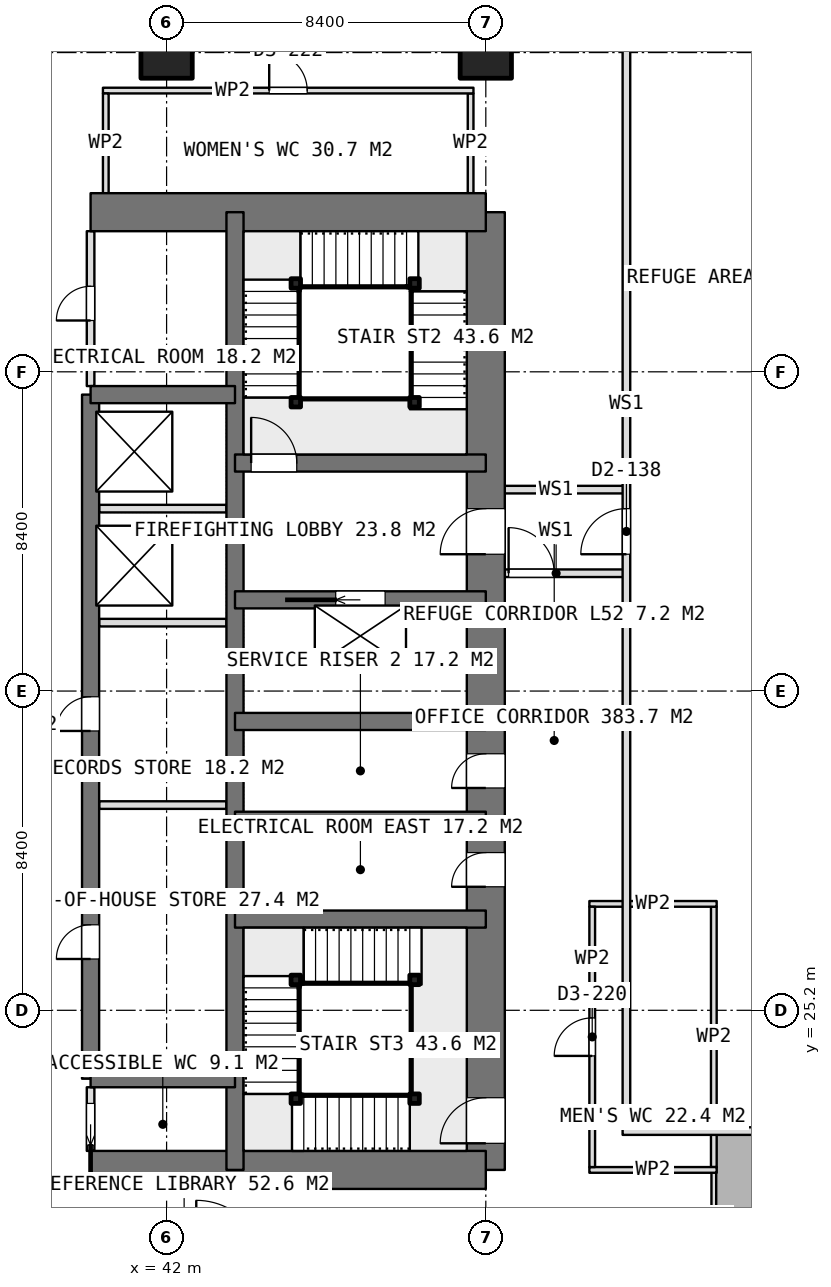
"""IFC4 building model, lengths in metres.
Left out: names, types, materials, properties, quantities, classifications, styles, units other than length and angle.
Written with IfcOpenShell. Run it as: python <this file> out.ifc"""

import sys

from ifc_helpers import new_model, si_unit, direction, frame, frame_2d, origin, origin_2d, place, context, subcontext, project, spatial, rectangle, extrude, element, fill, save


model = new_model("IFC4")
c1 = context("Model", 3, precision=1e-05, world=origin(), true_north=direction((0.0, 1.0)))
c2 = subcontext(c1, "Body", "Model", "MODEL_VIEW")
j1 = project(units=[si_unit("LENGTHUNIT", "METRE"), si_unit("PLANEANGLEUNIT", "RADIAN")], contexts=[c1])
p1 = place(None, origin())
s1 = spatial("IfcSite", under=j1, at=p1, CompositionType="ELEMENT")
p2 = place(p1, origin())
s2 = spatial("IfcBuilding", under=s1, at=p2, CompositionType="ELEMENT")
p3 = place(p2, frame((0.0, 0.0, 206.45)))
s3 = spatial("IfcBuildingStorey", under=s2, at=p3, CompositionType="ELEMENT", Elevation=206.45)
for number, where, z_axis, x_axis in (
    (1, (40.0, 21.0, 0.0), (0.0, 0.0, 1.0), (1.0, 0.0, 0.0)),
    (2, (40.0, 46.2, 0.0), (0.0, 0.0, 1.0), (1.0, 0.0, 0.0)),
):
    element("IfcWall", number, at=place(p3, frame(where, z_axis=z_axis, x_axis=x_axis)), inside=s3, PredefinedType="SHEAR", context=c2, shape_type="SweptSolid", body=[
        extrude(rectangle(XDim=10.4, YDim=1.0, at=frame_2d((5.2, 0.0))), origin(), (0.0, 0.0, 1.0), 3.75),
    ])
p4 = place(p3, frame((50.4, 21.0, 0.0), z_axis=(0.0, 0.0, 1.0), x_axis=(0.0, 1.0, 0.0)))
e3 = element("IfcWall", 3, at=p4, inside=s3, PredefinedType="SHEAR", context=c2, shape_type="SweptSolid", body=[
    extrude(rectangle(XDim=25.2, YDim=1.0, at=frame_2d((12.6, 0.0))), origin(), (0.0, 0.0, 1.0), 3.75),
])
p5 = place(p4, frame((16.2, 0.0, 0.0)))
e4 = element("IfcOpeningElement", 4, at=p5, cuts=e3, PredefinedType="OPENING", context=c2, shape_type="SweptSolid", body=[
    extrude(rectangle(XDim=1.2, YDim=2.1, at=frame_2d((0.6, 1.05))), frame((0.0, 0.51, 0.0), z_axis=(0.0, -1.0, 0.0), x_axis=(1.0, 0.0, 0.0)), (0.0, 0.0, 1.0), 1.02),
])
p6 = place(p4, frame((10.05, 0.0, 0.0)))
e5 = element("IfcOpeningElement", 5, at=p6, cuts=e3, PredefinedType="OPENING", context=c2, shape_type="SweptSolid", body=[
    extrude(rectangle(XDim=0.9, YDim=2.1, at=frame_2d((0.45, 1.05))), frame((0.0, 0.51, 0.0), z_axis=(0.0, -1.0, 0.0), x_axis=(1.0, 0.0, 0.0)), (0.0, 0.0, 1.0), 1.02),
])
p7 = place(p4, frame((7.45, 0.0, 0.0)))
e6 = element("IfcOpeningElement", 6, at=p7, cuts=e3, PredefinedType="OPENING", context=c2, shape_type="SweptSolid", body=[
    extrude(rectangle(XDim=0.9, YDim=2.1, at=frame_2d((0.45, 1.05))), frame((0.0, 0.51, 0.0), z_axis=(0.0, -1.0, 0.0), x_axis=(1.0, 0.0, 0.0)), (0.0, 0.0, 1.0), 1.02),
])
p8 = place(p4, frame((0.7, 0.0, 0.0)))
e7 = element("IfcOpeningElement", 7, at=p8, cuts=e3, PredefinedType="OPENING", context=c2, shape_type="SweptSolid", body=[
    extrude(rectangle(XDim=1.2, YDim=2.1, at=frame_2d((0.6, 1.05))), frame((0.0, 0.51, 0.0), z_axis=(0.0, -1.0, 0.0), x_axis=(1.0, 0.0, 0.0)), (0.0, 0.0, 1.0), 1.02),
])
p9 = place(p3, frame((43.8, 21.0, 0.0), z_axis=(0.0, 0.0, 1.0), x_axis=(0.0, 1.0, 0.0)))
e8 = element("IfcWall", 8, at=p9, inside=s3, PredefinedType="SHEAR", context=c2, shape_type="SweptSolid", body=[
    extrude(rectangle(XDim=25.2, YDim=0.45, at=frame_2d((12.6, 0.0))), origin(), (0.0, 0.0, 1.0), 3.75),
])
p10 = place(p3, frame((40.0, 23.4, 0.0), z_axis=(0.0, 0.0, 1.0), x_axis=(0.0, 1.0, 0.0)))
e9 = element("IfcWall", 9, at=p10, inside=s3, PredefinedType="SHEAR", context=c2, shape_type="SweptSolid", body=[
    extrude(rectangle(XDim=18.0, YDim=0.45, at=frame_2d((9.0, 0.0))), origin(), (0.0, 0.0, 1.0), 3.75),
])
p11 = place(p10, frame((3.15, 0.0, 0.0)))
e10 = element("IfcOpeningElement", 10, at=p11, cuts=e9, PredefinedType="OPENING", context=c2, shape_type="SweptSolid", body=[
    extrude(rectangle(XDim=0.9, YDim=2.1, at=frame_2d((0.45, 1.05))), frame((0.0, 0.235, 0.0), z_axis=(0.0, -1.0, 0.0), x_axis=(1.0, 0.0, 0.0)), (0.0, 0.0, 1.0), 0.47),
])
p12 = place(p10, frame((9.15, 0.0, 0.0)))
e11 = element("IfcOpeningElement", 11, at=p12, cuts=e9, PredefinedType="OPENING", context=c2, shape_type="SweptSolid", body=[
    extrude(rectangle(XDim=0.9, YDim=2.1, at=frame_2d((0.45, 1.05))), frame((0.0, 0.235, 0.0), z_axis=(0.0, -1.0, 0.0), x_axis=(1.0, 0.0, 0.0)), (0.0, 0.0, 1.0), 0.47),
])
for number, where, z_axis, x_axis in (
    (12, (40.0, 23.4, 0.0), (0.0, 0.0, 1.0), (1.0, 0.0, 0.0)),
    (13, (40.0, 41.4, 0.0), (0.0, 0.0, 1.0), (1.0, 0.0, 0.0)),
):
    element("IfcWall", number, at=place(p3, frame(where, z_axis=z_axis, x_axis=x_axis)), inside=s3, PredefinedType="SHEAR", context=c2, shape_type="SweptSolid", body=[
        extrude(rectangle(XDim=3.8, YDim=0.45, at=frame_2d((1.9, 0.0))), origin(), (0.0, 0.0, 1.0), 3.75),
    ])
for number, where, z_axis, x_axis in (
    (14, (43.8, 27.6, 0.0), (0.0, 0.0, 1.0), (1.0, 0.0, 0.0)),
    (15, (43.8, 30.2, 0.0), (0.0, 0.0, 1.0), (1.0, 0.0, 0.0)),
    (16, (43.8, 32.8, 0.0), (0.0, 0.0, 1.0), (1.0, 0.0, 0.0)),
):
    element("IfcWall", number, at=place(p3, frame(where, z_axis=z_axis, x_axis=x_axis)), inside=s3, PredefinedType="SHEAR", context=c2, shape_type="SweptSolid", body=[
        extrude(rectangle(XDim=6.6, YDim=0.45, at=frame_2d((3.3, 0.0))), origin(), (0.0, 0.0, 1.0), 3.75),
    ])
p13 = place(p3, frame((43.8, 36.0, 0.0), z_axis=(0.0, 0.0, 1.0), x_axis=(1.0, 0.0, 0.0)))
e17 = element("IfcWall", 17, at=p13, inside=s3, PredefinedType="SHEAR", context=c2, shape_type="SweptSolid", body=[
    extrude(rectangle(XDim=6.6, YDim=0.45, at=frame_2d((3.3, 0.0))), origin(), (0.0, 0.0, 1.0), 3.75),
])
p14 = place(p13, frame((2.65, 0.0, 0.0)))
e18 = element("IfcOpeningElement", 18, at=p14, cuts=e17, PredefinedType="OPENING", context=c2, shape_type="SweptSolid", body=[
    extrude(rectangle(XDim=1.3, YDim=2.1, at=frame_2d((0.65, 1.05))), frame((0.0, 0.235, 0.0), z_axis=(0.0, -1.0, 0.0), x_axis=(1.0, 0.0, 0.0)), (0.0, 0.0, 1.0), 0.47),
])
p15 = place(p3, frame((43.8, 39.6, 0.0), z_axis=(0.0, 0.0, 1.0), x_axis=(1.0, 0.0, 0.0)))
e19 = element("IfcWall", 19, at=p15, inside=s3, PredefinedType="SHEAR", context=c2, shape_type="SweptSolid", body=[
    extrude(rectangle(XDim=6.6, YDim=0.45, at=frame_2d((3.3, 0.0))), origin(), (0.0, 0.0, 1.0), 3.75),
])
p16 = place(p15, frame((0.425, 0.0, 0.0)))
e20 = element("IfcOpeningElement", 20, at=p16, cuts=e19, PredefinedType="OPENING", context=c2, shape_type="SweptSolid", body=[
    extrude(rectangle(XDim=1.2, YDim=2.1, at=frame_2d((0.6, 1.05))), frame((0.0, 0.235, 0.0), z_axis=(0.0, -1.0, 0.0), x_axis=(1.0, 0.0, 0.0)), (0.0, 0.0, 1.0), 0.47),
])
for number, where, z_axis, x_axis in (
    (21, (42.0, 50.4, 0.0), (0.0, 0.0, 1.0), (1.0, 0.0, 0.0)),
    (22, (50.4, 50.4, 0.0), (0.0, 0.0, 1.0), (1.0, 0.0, 0.0)),
):
    element("IfcColumn", number, at=place(p3, frame(where, z_axis=z_axis, x_axis=x_axis)), inside=s3, PredefinedType="COLUMN", context=c2, shape_type="SweptSolid", body=[
        extrude(rectangle(XDim=1.35, YDim=1.35, at=origin_2d()), origin(), (0.0, 0.0, 1.0), 3.75),
    ])
for number, where, z_axis, x_axis in (
    (23, (40.225, 35.4, 0.0), (0.0, 0.0, 1.0), (1.0, 0.0, 0.0)),
    (24, (40.225, 38.4, 0.0), (0.0, 0.0, 1.0), (1.0, 0.0, 0.0)),
):
    element("IfcWall", number, at=place(p3, frame(where, z_axis=z_axis, x_axis=x_axis)), inside=s3, PredefinedType="PARTITIONING", context=c2, shape_type="SweptSolid", body=[
        extrude(rectangle(XDim=3.35, YDim=0.2, at=frame_2d((1.675, 0.0))), origin(), (0.0, 0.0, 1.0), 3.5),
    ])
p17 = place(p3, frame((40.0, 21.5, 0.0), z_axis=(0.0, 0.0, 1.0), x_axis=(0.0, 1.0, 0.0)))
e25 = element("IfcWall", 25, at=p17, inside=s3, PredefinedType="PARTITIONING", context=c2, shape_type="SweptSolid", body=[
    extrude(rectangle(XDim=1.675, YDim=0.2, at=frame_2d((0.837, 0.0))), origin(), (0.0, 0.0, 1.0), 3.5),
])
p18 = place(p17, frame((0.15, 0.0, 0.0)))
e26 = element("IfcOpeningElement", 26, at=p18, cuts=e25, PredefinedType="OPENING", context=c2, shape_type="SweptSolid", body=[
    extrude(rectangle(XDim=1.1, YDim=2.1, at=frame_2d((0.55, 1.05))), frame((0.0, 0.11, 0.0), z_axis=(0.0, -1.0, 0.0), x_axis=(1.0, 0.0, 0.0)), (0.0, 0.0, 1.0), 0.22),
])
p19 = place(p3, frame((40.0, 41.625, 0.0), z_axis=(0.0, 0.0, 1.0), x_axis=(0.0, 1.0, 0.0)))
e27 = element("IfcWall", 27, at=p19, inside=s3, PredefinedType="PARTITIONING", context=c2, shape_type="SweptSolid", body=[
    extrude(rectangle(XDim=4.075, YDim=0.2, at=frame_2d((2.038, 0.0))), origin(), (0.0, 0.0, 1.0), 3.5),
])
p20 = place(p19, frame((1.725, 0.0, 0.0)))
e28 = element("IfcOpeningElement", 28, at=p20, cuts=e27, PredefinedType="OPENING", context=c2, shape_type="SweptSolid", body=[
    extrude(rectangle(XDim=0.9, YDim=2.1, at=frame_2d((0.45, 1.05))), frame((0.0, 0.11, 0.0), z_axis=(0.0, -1.0, 0.0), x_axis=(1.0, 0.0, 0.0)), (0.0, 0.0, 1.0), 0.22),
])
p21 = place(p3, frame((40.225, 30.6, 0.0), z_axis=(0.0, 0.0, 1.0), x_axis=(1.0, 0.0, 0.0)))
e29 = element("IfcWall", 29, at=p21, inside=s3, PredefinedType="PARTITIONING", context=c2, shape_type="SweptSolid", body=[
    extrude(rectangle(XDim=3.35, YDim=0.2, at=frame_2d((1.675, 0.0))), origin(), (0.0, 0.0, 1.0), 3.5),
])
p22 = place(p3, frame((40.325, 49.4, 0.0), z_axis=(0.0, 0.0, 1.0), x_axis=(1.0, 0.0, 0.0)))
e30 = element("IfcWall", 30, at=p22, inside=s3, PredefinedType="PARTITIONING", context=c2, shape_type="SweptSolid", body=[
    extrude(rectangle(XDim=9.75, YDim=0.15, at=frame_2d((4.875, 0.0))), origin(), (0.0, 0.0, 1.0), 3.5),
])
p23 = place(p22, frame((4.375, 0.0, 0.0)))
e31 = element("IfcOpeningElement", 31, at=p23, cuts=e30, PredefinedType="OPENING", context=c2, shape_type="SweptSolid", body=[
    extrude(rectangle(XDim=1.0, YDim=2.1, at=frame_2d((0.5, 1.05))), frame((0.0, 0.085, 0.0), z_axis=(0.0, -1.0, 0.0), x_axis=(1.0, 0.0, 0.0)), (0.0, 0.0, 1.0), 0.17),
])
for number, where, z_axis, x_axis in (
    (32, (40.4, 46.7, 0.0), (0.0, 0.0, 1.0), (0.0, 1.0, 0.0)),
    (33, (50.0, 46.7, 0.0), (0.0, 0.0, 1.0), (0.0, 1.0, 0.0)),
):
    element("IfcWall", number, at=place(p3, frame(where, z_axis=z_axis, x_axis=x_axis)), inside=s3, PredefinedType="PARTITIONING", context=c2, shape_type="SweptSolid", body=[
        extrude(rectangle(XDim=2.625, YDim=0.15, at=frame_2d((1.312, 0.0))), origin(), (0.0, 0.0, 1.0), 3.5),
    ])
for number, where, z_axis, x_axis in (
    (34, (53.125, 21.0, 0.0), (0.0, 0.0, 1.0), (1.0, 0.0, 0.0)),
    (35, (53.125, 28.0, 0.0), (0.0, 0.0, 1.0), (1.0, 0.0, 0.0)),
):
    element("IfcWall", number, at=place(p3, frame(where, z_axis=z_axis, x_axis=x_axis)), inside=s3, PredefinedType="PARTITIONING", context=c2, shape_type="SweptSolid", body=[
        extrude(rectangle(XDim=3.35, YDim=0.15, at=frame_2d((1.675, 0.0))), origin(), (0.0, 0.0, 1.0), 3.5),
    ])
p24 = place(p3, frame((53.2, 21.075, 0.0), z_axis=(0.0, 0.0, 1.0), x_axis=(0.0, 1.0, 0.0)))
e36 = element("IfcWall", 36, at=p24, inside=s3, PredefinedType="PARTITIONING", context=c2, shape_type="SweptSolid", body=[
    extrude(rectangle(XDim=6.85, YDim=0.15, at=frame_2d((3.425, 0.0))), origin(), (0.0, 0.0, 1.0), 3.5),
])
p25 = place(p24, frame((2.925, 0.0, 0.0)))
e37 = element("IfcOpeningElement", 37, at=p25, cuts=e36, PredefinedType="OPENING", context=c2, shape_type="SweptSolid", body=[
    extrude(rectangle(XDim=1.0, YDim=2.1, at=frame_2d((0.5, 1.05))), frame((0.0, 0.085, 0.0), z_axis=(0.0, -1.0, 0.0), x_axis=(1.0, 0.0, 0.0)), (0.0, 0.0, 1.0), 0.17),
])
p26 = place(p3, frame((56.4, 21.075, 0.0), z_axis=(0.0, 0.0, 1.0), x_axis=(0.0, 1.0, 0.0)))
e38 = element("IfcWall", 38, at=p26, inside=s3, PredefinedType="PARTITIONING", context=c2, shape_type="SweptSolid", body=[
    extrude(rectangle(XDim=6.85, YDim=0.15, at=frame_2d((3.425, 0.0))), origin(), (0.0, 0.0, 1.0), 3.5),
])
p27 = place(p3, frame((56.4, 18.4, 0.0), z_axis=(0.0, 0.0, 1.0), x_axis=(0.0, 1.0, 0.0)))
e39 = element("IfcWall", 39, at=p27, inside=s3, PredefinedType="PARTITIONING", context=c2, shape_type="SweptSolid", body=[
    extrude(rectangle(XDim=2.675, YDim=0.125, at=frame_2d((1.337, 0.0))), origin(), (0.0, 0.0, 1.0), 3.5),
])
for number, where, z_axis, x_axis in (
    (40, (45.4, 41.2, 0.0), (0.0, 0.0, 1.0), (1.0, 0.0, 0.0)),
    (41, (45.4, 44.325, 0.0), (0.0, 0.0, 1.0), (1.0, 0.0, 0.0)),
    (42, (48.525, 44.325, 0.0), (0.0, 0.0, 1.0), (1.0, 0.0, 0.0)),
    (43, (48.525, 41.2, 0.0), (0.0, 0.0, 1.0), (1.0, 0.0, 0.0)),
    (44, (48.525, 22.875, 0.0), (0.0, 0.0, 1.0), (1.0, 0.0, 0.0)),
    (45, (45.4, 22.875, 0.0), (0.0, 0.0, 1.0), (1.0, 0.0, 0.0)),
    (46, (45.4, 26.0, 0.0), (0.0, 0.0, 1.0), (1.0, 0.0, 0.0)),
    (47, (48.525, 26.0, 0.0), (0.0, 0.0, 1.0), (1.0, 0.0, 0.0)),
):
    element("IfcColumn", number, at=place(p3, frame(where, z_axis=z_axis, x_axis=x_axis)), inside=s3, PredefinedType="COLUMN", context=c2, shape_type="SweptSolid", body=[
        extrude(rectangle(XDim=0.25, YDim=0.25, at=origin_2d()), origin(), (0.0, 0.0, 1.0), 3.75),
    ])
p28 = place(p3, frame((54.1, 22.122, 0.0), z_axis=(0.0, 0.0, 1.0), x_axis=(0.0, 1.0, 0.0)))
e48 = element("IfcWall", 48, at=p28, inside=s3, PredefinedType="PARTITIONING", context=c2, shape_type="SweptSolid", body=[
    extrude(rectangle(XDim=38.087, YDim=0.2, at=frame_2d((19.043, 0.0))), origin(), (0.0, 0.0, 1.0), 3.5),
])
p29 = place(p28, frame((15.078, 0.0, 0.0)))
e49 = element("IfcOpeningElement", 49, at=p29, cuts=e48, PredefinedType="OPENING", context=c2, shape_type="SweptSolid", body=[
    extrude(rectangle(XDim=1.2, YDim=2.1, at=frame_2d((0.6, 1.05))), frame((0.0, 0.11, 0.0), z_axis=(0.0, -1.0, 0.0), x_axis=(1.0, 0.0, 0.0)), (0.0, 0.0, 1.0), 0.22),
])
p30 = place(p3, frame((54.0, 22.022, 0.0), z_axis=(0.0, 0.0, 1.0), x_axis=(1.0, 0.0, 0.0)))
e50 = element("IfcWall", 50, at=p30, inside=s3, PredefinedType="PARTITIONING", context=c2, shape_type="SweptSolid", body=[
    extrude(rectangle(XDim=7.26, YDim=0.2, at=frame_2d((3.63, 0.0))), origin(), (0.0, 0.0, 1.0), 3.5),
])
p31 = place(p3, frame((50.4, 38.9, 0.0), z_axis=(0.0, 0.0, 1.0), x_axis=(1.0, 0.0, 0.0)))
e51 = element("IfcWall", 51, at=p31, inside=s3, PredefinedType="PARTITIONING", context=c2, shape_type="SweptSolid", body=[
    extrude(rectangle(XDim=3.7, YDim=0.2, at=frame_2d((1.85, 0.0))), origin(), (0.0, 0.0, 1.0), 3.5),
])
p32 = place(p3, frame((50.4, 36.7, 0.0), z_axis=(0.0, 0.0, 1.0), x_axis=(1.0, 0.0, 0.0)))
e52 = element("IfcWall", 52, at=p32, inside=s3, PredefinedType="PARTITIONING", context=c2, shape_type="SweptSolid", body=[
    extrude(rectangle(XDim=3.7, YDim=0.2, at=frame_2d((1.85, 0.0))), origin(), (0.0, 0.0, 1.0), 3.5),
])
p33 = place(p32, frame((0.6, 0.0, 0.0)))
e53 = element("IfcOpeningElement", 53, at=p33, cuts=e52, PredefinedType="OPENING", context=c2, shape_type="SweptSolid", body=[
    extrude(rectangle(XDim=1.2, YDim=2.1, at=frame_2d((0.6, 1.05))), frame((0.0, 0.11, 0.0), z_axis=(0.0, -1.0, 0.0), x_axis=(1.0, 0.0, 0.0)), (0.0, 0.0, 1.0), 0.22),
])
p34 = place(p5, origin())
e54 = element("IfcDoor", 54, at=p34, inside=s3, OperationType="SINGLE_SWING_LEFT", PredefinedType="DOOR", context=c2, shape_type="SweptSolid", body=[
    extrude(rectangle(XDim=1.2, YDim=2.1, at=frame_2d((0.6, 1.05))), frame((0.0, 0.025, 0.0), z_axis=(0.0, -1.0, 0.0), x_axis=(1.0, 0.0, 0.0)), (0.0, 0.0, 1.0), 0.05),
])
fill(e4, e54)
p35 = place(p6, origin())
e55 = element("IfcDoor", 55, at=p35, inside=s3, OperationType="SINGLE_SWING_LEFT", PredefinedType="DOOR", context=c2, shape_type="SweptSolid", body=[
    extrude(rectangle(XDim=0.9, YDim=2.1, at=frame_2d((0.45, 1.05))), frame((0.0, 0.025, 0.0), z_axis=(0.0, -1.0, 0.0), x_axis=(1.0, 0.0, 0.0)), (0.0, 0.0, 1.0), 0.05),
])
fill(e5, e55)
p36 = place(p7, origin())
e56 = element("IfcDoor", 56, at=p36, inside=s3, OperationType="SINGLE_SWING_LEFT", PredefinedType="DOOR", context=c2, shape_type="SweptSolid", body=[
    extrude(rectangle(XDim=0.9, YDim=2.1, at=frame_2d((0.45, 1.05))), frame((0.0, 0.025, 0.0), z_axis=(0.0, -1.0, 0.0), x_axis=(1.0, 0.0, 0.0)), (0.0, 0.0, 1.0), 0.05),
])
fill(e6, e56)
p37 = place(p18, origin())
e57 = element("IfcDoor", 57, at=p37, inside=s3, OperationType="SLIDING_TO_LEFT", PredefinedType="DOOR", context=c2, shape_type="SweptSolid", body=[
    extrude(rectangle(XDim=1.1, YDim=2.1, at=frame_2d((0.55, 1.05))), frame((0.0, 0.025, 0.0), z_axis=(0.0, -1.0, 0.0), x_axis=(1.0, 0.0, 0.0)), (0.0, 0.0, 1.0), 0.05),
])
fill(e26, e57)
p38 = place(p20, origin())
e58 = element("IfcDoor", 58, at=p38, inside=s3, OperationType="SINGLE_SWING_LEFT", PredefinedType="DOOR", context=c2, shape_type="SweptSolid", body=[
    extrude(rectangle(XDim=0.9, YDim=2.1, at=frame_2d((0.45, 1.05))), frame((0.0, 0.025, 0.0), z_axis=(0.0, -1.0, 0.0), x_axis=(1.0, 0.0, 0.0)), (0.0, 0.0, 1.0), 0.05),
])
fill(e28, e58)
p39 = place(p11, origin())
e59 = element("IfcDoor", 59, at=p39, inside=s3, OperationType="SINGLE_SWING_LEFT", PredefinedType="DOOR", context=c2, shape_type="SweptSolid", body=[
    extrude(rectangle(XDim=0.9, YDim=2.1, at=frame_2d((0.45, 1.05))), frame((0.0, 0.025, 0.0), z_axis=(0.0, -1.0, 0.0), x_axis=(1.0, 0.0, 0.0)), (0.0, 0.0, 1.0), 0.05),
])
fill(e10, e59)
p40 = place(p12, origin())
e60 = element("IfcDoor", 60, at=p40, inside=s3, OperationType="SINGLE_SWING_LEFT", PredefinedType="DOOR", context=c2, shape_type="SweptSolid", body=[
    extrude(rectangle(XDim=0.9, YDim=2.1, at=frame_2d((0.45, 1.05))), frame((0.0, 0.025, 0.0), z_axis=(0.0, -1.0, 0.0), x_axis=(1.0, 0.0, 0.0)), (0.0, 0.0, 1.0), 0.05),
])
fill(e11, e60)
p41 = place(p14, origin())
e61 = element("IfcDoor", 61, at=p41, inside=s3, OperationType="SLIDING_TO_LEFT", PredefinedType="USERDEFINED", context=c2, shape_type="SweptSolid", body=[
    extrude(rectangle(XDim=1.3, YDim=2.1, at=frame_2d((0.65, 1.05))), frame((0.0, 0.025, 0.0), z_axis=(0.0, -1.0, 0.0), x_axis=(1.0, 0.0, 0.0)), (0.0, 0.0, 1.0), 0.05),
])
fill(e18, e61)
p42 = place(p23, origin())
e62 = element("IfcDoor", 62, at=p42, inside=s3, OperationType="SINGLE_SWING_LEFT", PredefinedType="DOOR", context=c2, shape_type="SweptSolid", body=[
    extrude(rectangle(XDim=1.0, YDim=2.1, at=frame_2d((0.5, 1.05))), frame((0.0, 0.025, 0.0), z_axis=(0.0, -1.0, 0.0), x_axis=(1.0, 0.0, 0.0)), (0.0, 0.0, 1.0), 0.05),
])
fill(e31, e62)
p43 = place(p25, origin())
e63 = element("IfcDoor", 63, at=p43, inside=s3, OperationType="SINGLE_SWING_LEFT", PredefinedType="DOOR", context=c2, shape_type="SweptSolid", body=[
    extrude(rectangle(XDim=1.0, YDim=2.1, at=frame_2d((0.5, 1.05))), frame((0.0, 0.025, 0.0), z_axis=(0.0, -1.0, 0.0), x_axis=(1.0, 0.0, 0.0)), (0.0, 0.0, 1.0), 0.05),
])
fill(e37, e63)
p44 = place(p16, origin())
e64 = element("IfcDoor", 64, at=p44, inside=s3, OperationType="SINGLE_SWING_RIGHT", PredefinedType="DOOR", context=c2, shape_type="SweptSolid", body=[
    extrude(rectangle(XDim=1.2, YDim=2.1, at=frame_2d((0.6, 1.05))), frame((0.0, 0.025, 0.0), z_axis=(0.0, -1.0, 0.0), x_axis=(1.0, 0.0, 0.0)), (0.0, 0.0, 1.0), 0.05),
])
fill(e20, e64)
p45 = place(p8, origin())
e65 = element("IfcDoor", 65, at=p45, inside=s3, OperationType="SINGLE_SWING_RIGHT", PredefinedType="DOOR", context=c2, shape_type="SweptSolid", body=[
    extrude(rectangle(XDim=1.2, YDim=2.1, at=frame_2d((0.6, 1.05))), frame((0.0, 0.025, 0.0), z_axis=(0.0, -1.0, 0.0), x_axis=(1.0, 0.0, 0.0)), (0.0, 0.0, 1.0), 0.05),
])
fill(e7, e65)
p46 = place(p29, origin())
e66 = element("IfcDoor", 66, at=p46, inside=s3, OperationType="SINGLE_SWING_LEFT", PredefinedType="DOOR", context=c2, shape_type="SweptSolid", body=[
    extrude(rectangle(XDim=1.2, YDim=2.1, at=frame_2d((0.6, 1.05))), frame((0.0, 0.025, 0.0), z_axis=(0.0, -1.0, 0.0), x_axis=(1.0, 0.0, 0.0)), (0.0, 0.0, 1.0), 0.05),
])
fill(e49, e66)
p47 = place(p33, origin())
e67 = element("IfcDoor", 67, at=p47, inside=s3, OperationType="SINGLE_SWING_LEFT", PredefinedType="DOOR", context=c2, shape_type="SweptSolid", body=[
    extrude(rectangle(XDim=1.2, YDim=2.1, at=frame_2d((0.6, 1.05))), frame((0.0, 0.025, 0.0), z_axis=(0.0, -1.0, 0.0), x_axis=(1.0, 0.0, 0.0)), (0.0, 0.0, 1.0), 0.05),
])
fill(e53, e67)
save(model, sys.argv[1])
